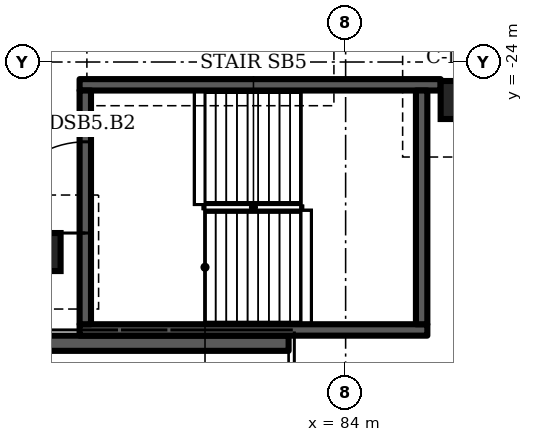
"""IFC4 building model, lengths in metres.
Left out: names, types, materials, properties, quantities, classifications, styles, units other than length and angle.
Written with IfcOpenShell. Run it as: python <this file> out.ifc"""

import sys

from ifc_helpers import new_model, si_unit, direction, frame, frame_2d, origin, origin_2d, place, context, subcontext, project, spatial, rectangle, extrude, element, fill, save


model = new_model("IFC4")
c1 = context("Model", 3, precision=1e-05, world=origin(), true_north=direction((0.0, 1.0)))
c2 = subcontext(c1, "Body", "Model", "MODEL_VIEW")
j1 = project(units=[si_unit("LENGTHUNIT", "METRE"), si_unit("PLANEANGLEUNIT", "RADIAN")], contexts=[c1])
p1 = place(None, origin())
s1 = spatial("IfcSite", under=j1, at=p1, CompositionType="ELEMENT")
p2 = place(p1, origin())
s2 = spatial("IfcBuilding", under=s1, at=p2, CompositionType="ELEMENT")
p3 = place(p2, frame((0.0, 0.0, -14.4)))
s3 = spatial("IfcBuildingStorey", under=s2, at=p3, CompositionType="ELEMENT", Elevation=-14.4)
p4 = place(p3, frame((7.5, -31.4, -0.9), z_axis=(0.0, 0.0, 1.0), x_axis=(1.0, 0.0, 0.0)))
e1 = element("IfcWall", 1, at=p4, inside=s3, PredefinedType="SOLIDWALL", context=c2, shape_type="SweptSolid", body=[
    extrude(rectangle(XDim=75.0, YDim=0.4, at=frame_2d((37.5, 0.0))), origin(), (0.0, 0.0, 1.0), 0.9),
])
for number, where, z_axis, x_axis in (
    (2, (87.0, -25.0, 0.0), (0.0, 0.0, 1.0), (1.0, 0.0, 0.0)),
    (3, (76.0, -29.0, 0.0), (0.0, 0.0, 1.0), (1.0, 0.0, 0.0)),
):
    element("IfcColumn", number, at=place(p3, frame(where, z_axis=z_axis, x_axis=x_axis)), inside=s3, PredefinedType="COLUMN", context=c2, shape_type="SweptSolid", body=[
        extrude(rectangle(XDim=1.0, YDim=1.0, at=origin_2d()), origin(), (0.0, 0.0, 1.0), 7.2),
    ])
p5 = place(p3, frame((77.0, -31.05, 0.0), z_axis=(0.0, 0.0, 1.0), x_axis=(1.0, 0.0, 0.0)))
e4 = element("IfcWall", 4, at=p5, inside=s3, PredefinedType="SHEAR", context=c2, shape_type="SweptSolid", body=[
    extrude(rectangle(XDim=9.15, YDim=0.3, at=frame_2d((4.575, 0.0))), origin(), (0.0, 0.0, 1.0), 6.9),
])
p6 = place(p3, frame((77.0, -24.6, 0.0), z_axis=(0.0, 0.0, 1.0), x_axis=(1.0, 0.0, 0.0)))
e5 = element("IfcWall", 5, at=p6, inside=s3, PredefinedType="SHEAR", context=c2, shape_type="SweptSolid", body=[
    extrude(rectangle(XDim=9.5, YDim=0.3, at=frame_2d((4.75, 0.0))), origin(), (0.0, 0.0, 1.0), 6.9),
])
p7 = place(p3, frame((77.15, -30.9, 0.0), z_axis=(0.0, 0.0, 1.0), x_axis=(0.0, 1.0, 0.0)))
e6 = element("IfcWall", 6, at=p7, inside=s3, PredefinedType="SHEAR", context=c2, shape_type="SweptSolid", body=[
    extrude(rectangle(XDim=6.15, YDim=0.3, at=frame_2d((3.075, 0.0))), origin(), (0.0, 0.0, 1.0), 6.9),
])
p8 = place(p7, frame((2.4, 0.0, 0.0)))
e7 = element("IfcOpeningElement", 7, at=p8, cuts=e6, PredefinedType="OPENING", context=c2, shape_type="SweptSolid", body=[
    extrude(rectangle(XDim=2.4, YDim=2.1, at=frame_2d((1.2, 1.05))), frame((0.0, 0.16, 0.0), z_axis=(0.0, -1.0, 0.0), x_axis=(1.0, 0.0, 0.0)), (0.0, 0.0, 1.0), 0.32),
])
p9 = place(p3, frame((86.0, -30.9, 0.0), z_axis=(0.0, 0.0, 1.0), x_axis=(0.0, 1.0, 0.0)))
e8 = element("IfcWall", 8, at=p9, inside=s3, PredefinedType="SHEAR", context=c2, shape_type="SweptSolid", body=[
    extrude(rectangle(XDim=6.15, YDim=0.3, at=frame_2d((3.075, 0.0))), origin(), (0.0, 0.0, 1.0), 6.9),
])
p10 = place(p8, origin())
e9 = element("IfcDoor", 9, at=p10, inside=s3, OperationType="DOUBLE_DOOR_SINGLE_SWING", PredefinedType="DOOR", context=c2, shape_type="SweptSolid", body=[
    extrude(rectangle(XDim=2.4, YDim=2.1, at=frame_2d((1.2, 1.05))), frame((0.0, 0.025, 0.0), z_axis=(0.0, -1.0, 0.0), x_axis=(1.0, 0.0, 0.0)), (0.0, 0.0, 1.0), 0.05),
])
fill(e7, e9)
save(model, sys.argv[1])
